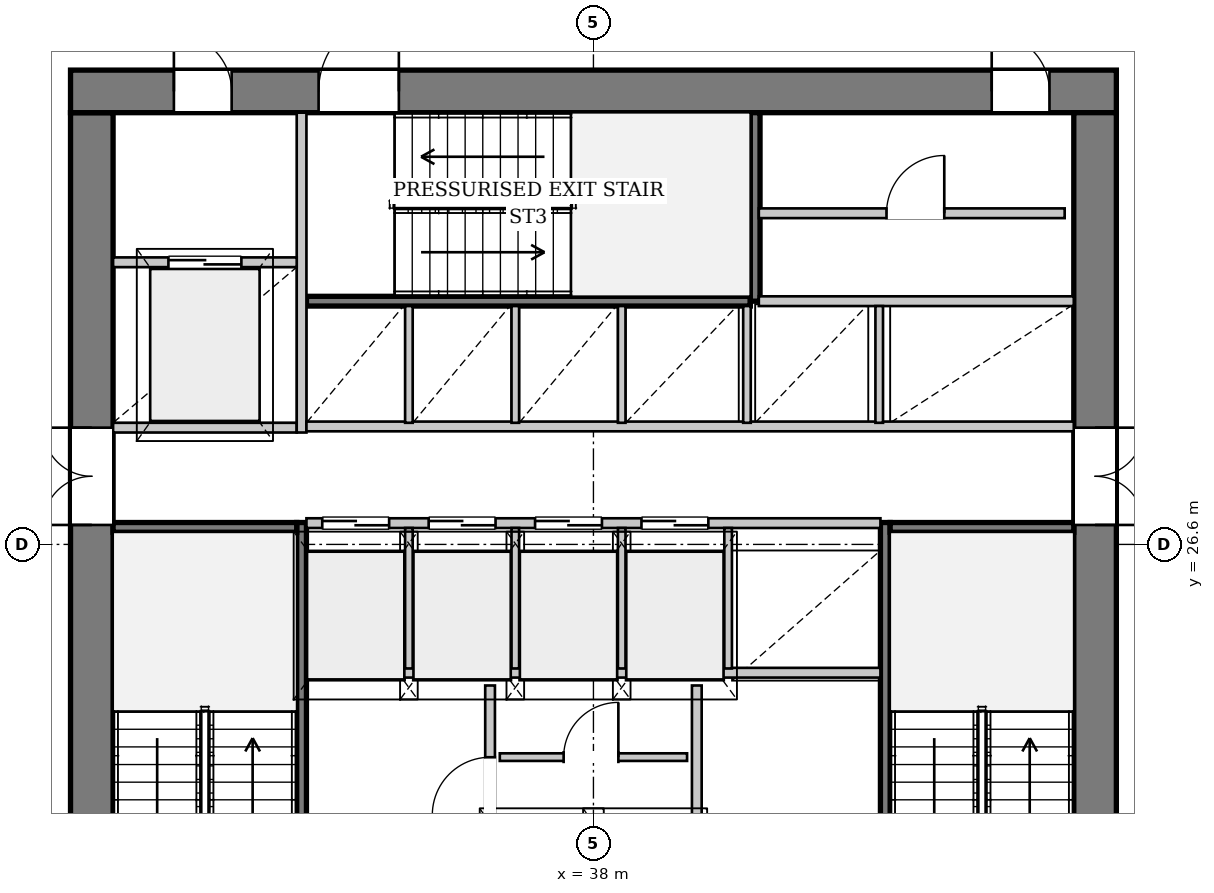
"""IFC4 building model, lengths in metres.
Left out: names, types, materials, properties, quantities, classifications, styles, units other than length and angle.
Written with IfcOpenShell. Run it as: python <this file> out.ifc"""

import sys

from ifc_helpers import new_model, si_unit, direction, frame, frame_2d, origin, place, context, subcontext, project, spatial, rectangle, extrude, source, transform, mapped, element, fill, save


model = new_model("IFC4")
c1 = context("Model", 3, precision=1e-05, world=origin(), true_north=direction((0.0, 1.0)))
c2 = subcontext(c1, "Body", "Model", "MODEL_VIEW")
j1 = project(units=[si_unit("LENGTHUNIT", "METRE"), si_unit("PLANEANGLEUNIT", "RADIAN")], contexts=[c1])
p1 = place(None, origin())
s1 = spatial("IfcSite", under=j1, at=p1, CompositionType="ELEMENT")
p2 = place(p1, origin())
s2 = spatial("IfcBuilding", under=s1, at=p2, CompositionType="ELEMENT")
p3 = place(p2, frame((0.0, 0.0, 102.15)))
s3 = spatial("IfcBuildingStorey", under=s2, at=p3, CompositionType="ELEMENT", Elevation=102.15)
p4 = place(p3, frame((29.75, 19.5, 0.0), z_axis=(0.0, 0.0, 1.0), x_axis=(0.0, 1.0, 0.0)))
e1 = element("IfcWall", 1, at=p4, inside=s3, PredefinedType="SHEAR", context=c2, shape_type="SweptSolid", body=[
    extrude(rectangle(XDim=14.2, YDim=0.7, at=frame_2d((7.1, 0.0))), origin(), (0.0, 0.0, 1.0), 3.3),
])
p5 = place(p4, frame((7.42, 0.0, 0.0)))
e2 = element("IfcOpeningElement", 2, at=p5, cuts=e1, PredefinedType="OPENING", context=c2, shape_type="SweptSolid", body=[
    extrude(rectangle(XDim=1.6, YDim=2.2, at=frame_2d((0.8, 1.1))), frame((0.0, 0.36, 0.0), z_axis=(0.0, -1.0, 0.0), x_axis=(1.0, 0.0, 0.0)), (0.0, 0.0, 1.0), 0.72),
])
p6 = place(p3, frame((29.4, 34.05, 0.0), z_axis=(0.0, 0.0, 1.0), x_axis=(1.0, 0.0, 0.0)))
e3 = element("IfcWall", 3, at=p6, inside=s3, PredefinedType="SHEAR", context=c2, shape_type="SweptSolid", body=[
    extrude(rectangle(XDim=17.2, YDim=0.7, at=frame_2d((8.6, 0.0))), origin(), (0.0, 0.0, 1.0), 3.3),
])
p7 = place(p6, frame((1.7, 0.0, 0.0)))
e4 = element("IfcOpeningElement", 4, at=p7, cuts=e3, PredefinedType="OPENING", context=c2, shape_type="SweptSolid", body=[
    extrude(rectangle(XDim=0.95, YDim=2.1, at=frame_2d((0.475, 1.05))), frame((0.0, 0.36, 0.0), z_axis=(0.0, -1.0, 0.0), x_axis=(1.0, 0.0, 0.0)), (0.0, 0.0, 1.0), 0.72),
])
p8 = place(p6, frame((4.08, 0.0, 0.0)))
e5 = element("IfcOpeningElement", 5, at=p8, cuts=e3, PredefinedType="OPENING", context=c2, shape_type="SweptSolid", body=[
    extrude(rectangle(XDim=1.32, YDim=2.2, at=frame_2d((0.66, 1.1))), frame((0.0, 0.36, 0.0), z_axis=(0.0, -1.0, 0.0), x_axis=(1.0, 0.0, 0.0)), (0.0, 0.0, 1.0), 0.72),
])
p9 = place(p6, frame((15.15, 0.0, 0.0)))
e6 = element("IfcOpeningElement", 6, at=p9, cuts=e3, PredefinedType="OPENING", context=c2, shape_type="SweptSolid", body=[
    extrude(rectangle(XDim=0.95, YDim=2.1, at=frame_2d((0.475, 1.05))), frame((0.0, 0.36, 0.0), z_axis=(0.0, -1.0, 0.0), x_axis=(1.0, 0.0, 0.0)), (0.0, 0.0, 1.0), 0.72),
])
p10 = place(p3, frame((46.25, 33.7, 0.0), z_axis=(0.0, 0.0, 1.0), x_axis=(0.0, -1.0, 0.0)))
e7 = element("IfcWall", 7, at=p10, inside=s3, PredefinedType="SHEAR", context=c2, shape_type="SweptSolid", body=[
    extrude(rectangle(XDim=14.2, YDim=0.7, at=frame_2d((7.1, 0.0))), origin(), (0.0, 0.0, 1.0), 3.3),
])
p11 = place(p10, frame((5.18, 0.0, 0.0)))
e8 = element("IfcOpeningElement", 8, at=p11, cuts=e7, PredefinedType="OPENING", context=c2, shape_type="SweptSolid", body=[
    extrude(rectangle(XDim=1.6, YDim=2.2, at=frame_2d((0.8, 1.1))), frame((0.0, 0.36, 0.0), z_axis=(0.0, -1.0, 0.0), x_axis=(1.0, 0.0, 0.0)), (0.0, 0.0, 1.0), 0.72),
])
p12 = place(p3, frame((33.2, 19.5, 0.0), z_axis=(0.0, 0.0, 1.0), x_axis=(0.0, 1.0, 0.0)))
e9 = element("IfcWall", 9, at=p12, inside=s3, PredefinedType="PARTITIONING", context=c2, shape_type="SweptSolid", body=[
    extrude(rectangle(XDim=7.46, YDim=0.16, at=frame_2d((3.73, 0.0))), origin(), (0.0, 0.0, 1.0), 3.3),
])
p13 = place(p12, frame((0.08, 0.0, 0.0)))
e10 = element("IfcOpeningElement", 10, at=p13, cuts=e9, PredefinedType="OPENING", context=c2, shape_type="SweptSolid", body=[
    extrude(rectangle(XDim=1.32, YDim=2.2, at=frame_2d((0.66, 1.1))), frame((0.0, 0.09, 0.0), z_axis=(0.0, -1.0, 0.0), x_axis=(1.0, 0.0, 0.0)), (0.0, 0.0, 1.0), 0.18),
])
p14 = place(p3, frame((30.1, 26.88, 0.0), z_axis=(0.0, 0.0, 1.0), x_axis=(1.0, 0.0, 0.0)))
e11 = element("IfcWall", 11, at=p14, inside=s3, PredefinedType="PARTITIONING", context=c2, shape_type="SweptSolid", body=[
    extrude(rectangle(XDim=3.02, YDim=0.16, at=frame_2d((1.51, 0.0))), origin(), (0.0, 0.0, 1.0), 3.3),
])
p15 = place(p3, frame((42.8, 26.96, 0.0), z_axis=(0.0, 0.0, 1.0), x_axis=(0.0, -1.0, 0.0)))
e12 = element("IfcWall", 12, at=p15, inside=s3, PredefinedType="PARTITIONING", context=c2, shape_type="SweptSolid", body=[
    extrude(rectangle(XDim=7.46, YDim=0.16, at=frame_2d((3.73, 0.0))), origin(), (0.0, 0.0, 1.0), 3.3),
])
p16 = place(p15, frame((6.06, 0.0, 0.0)))
e13 = element("IfcOpeningElement", 13, at=p16, cuts=e12, PredefinedType="OPENING", context=c2, shape_type="SweptSolid", body=[
    extrude(rectangle(XDim=1.32, YDim=2.2, at=frame_2d((0.66, 1.1))), frame((0.0, 0.09, 0.0), z_axis=(0.0, -1.0, 0.0), x_axis=(1.0, 0.0, 0.0)), (0.0, 0.0, 1.0), 0.18),
])
p17 = place(p3, frame((42.88, 26.88, 0.0), z_axis=(0.0, 0.0, 1.0), x_axis=(1.0, 0.0, 0.0)))
e14 = element("IfcWall", 14, at=p17, inside=s3, PredefinedType="PARTITIONING", context=c2, shape_type="SweptSolid", body=[
    extrude(rectangle(XDim=3.02, YDim=0.16, at=frame_2d((1.51, 0.0))), origin(), (0.0, 0.0, 1.0), 3.3),
])
p18 = place(p3, frame((33.28, 30.6, 0.0), z_axis=(0.0, 0.0, 1.0), x_axis=(1.0, 0.0, 0.0)))
e15 = element("IfcWall", 15, at=p18, inside=s3, PredefinedType="PARTITIONING", context=c2, shape_type="SweptSolid", body=[
    extrude(rectangle(XDim=7.3, YDim=0.16, at=frame_2d((3.65, 0.0))), origin(), (0.0, 0.0, 1.0), 3.3),
])
p19 = place(p3, frame((40.66, 30.6, 0.0), z_axis=(0.0, 0.0, 1.0), x_axis=(0.0, 1.0, 0.0)))
e16 = element("IfcWall", 16, at=p19, inside=s3, PredefinedType="PARTITIONING", context=c2, shape_type="SweptSolid", body=[
    extrude(rectangle(XDim=3.1, YDim=0.16, at=frame_2d((1.55, 0.0))), origin(), (0.0, 0.0, 1.0), 3.3),
])
p20 = place(p3, frame((36.3, 19.5, 0.0), z_axis=(0.0, 0.0, 1.0), x_axis=(0.0, 1.0, 0.0)))
e17 = element("IfcWall", 17, at=p20, inside=s3, PredefinedType="PARTITIONING", context=c2, shape_type="SweptSolid", body=[
    extrude(rectangle(XDim=4.78, YDim=0.16, at=frame_2d((2.39, 0.0))), origin(), (0.0, 0.0, 1.0), 3.3),
])
p21 = place(p20, frame((0.6, 0.0, 0.0)))
e18 = element("IfcOpeningElement", 18, at=p21, cuts=e17, PredefinedType="OPENING", context=c2, shape_type="SweptSolid", body=[
    extrude(rectangle(XDim=1.2, YDim=2.2, at=frame_2d((0.6, 1.1))), frame((0.0, 0.09, 0.0), z_axis=(0.0, -1.0, 0.0), x_axis=(1.0, 0.0, 0.0)), (0.0, 0.0, 1.0), 0.18),
])
p22 = place(p20, frame((2.65, 0.0, 0.0)))
e19 = element("IfcOpeningElement", 19, at=p22, cuts=e17, PredefinedType="OPENING", context=c2, shape_type="SweptSolid", body=[
    extrude(rectangle(XDim=0.95, YDim=2.1, at=frame_2d((0.475, 1.05))), frame((0.0, 0.09, 0.0), z_axis=(0.0, -1.0, 0.0), x_axis=(1.0, 0.0, 0.0)), (0.0, 0.0, 1.0), 0.18),
])
p23 = place(p3, frame((39.7, 24.28, 0.0), z_axis=(0.0, 0.0, 1.0), x_axis=(0.0, -1.0, 0.0)))
e20 = element("IfcWall", 20, at=p23, inside=s3, PredefinedType="PARTITIONING", context=c2, shape_type="SweptSolid", body=[
    extrude(rectangle(XDim=4.78, YDim=0.16, at=frame_2d((2.39, 0.0))), origin(), (0.0, 0.0, 1.0), 3.3),
])
p24 = place(p23, frame((3.12, 0.0, 0.0)))
e21 = element("IfcOpeningElement", 21, at=p24, cuts=e20, PredefinedType="OPENING", context=c2, shape_type="SweptSolid", body=[
    extrude(rectangle(XDim=1.2, YDim=2.2, at=frame_2d((0.6, 1.1))), frame((0.0, 0.09, 0.0), z_axis=(0.0, -1.0, 0.0), x_axis=(1.0, 0.0, 0.0)), (0.0, 0.0, 1.0), 0.18),
])
p25 = place(p3, frame((33.28, 24.49, 0.0), z_axis=(0.0, 0.0, 1.0), x_axis=(1.0, 0.0, 0.0)))
e22 = element("IfcWall", 22, at=p25, inside=s3, PredefinedType="PARTITIONING", context=c2, shape_type="SweptSolid", body=[
    extrude(rectangle(XDim=9.44, YDim=0.16, at=frame_2d((4.72, 0.0))), origin(), (0.0, 0.0, 1.0), 3.3),
])
p26 = place(p3, frame((36.46, 23.102, 0.0), z_axis=(0.0, 0.0, 1.0), x_axis=(1.0, 0.0, 0.0)))
e23 = element("IfcWall", 23, at=p26, inside=s3, PredefinedType="PARTITIONING", context=c2, shape_type="SweptSolid", body=[
    extrude(rectangle(XDim=3.08, YDim=0.125, at=frame_2d((1.54, 0.0))), origin(), (0.0, 0.0, 1.0), 3.3),
])
p27 = place(p26, frame((1.05, 0.0, 0.0)))
e24 = element("IfcOpeningElement", 24, at=p27, cuts=e23, PredefinedType="OPENING", context=c2, shape_type="SweptSolid", body=[
    extrude(rectangle(XDim=0.9, YDim=2.1, at=frame_2d((0.45, 1.05))), frame((0.0, 0.073, 0.0), z_axis=(0.0, -1.0, 0.0), x_axis=(1.0, 0.0, 0.0)), (0.0, 0.0, 1.0), 0.145),
])
p28 = place(p3, frame((30.1, 28.52, 0.0), z_axis=(0.0, 0.0, 1.0), x_axis=(1.0, 0.0, 0.0)))
e25 = element("IfcWall", 25, at=p28, inside=s3, PredefinedType="PARTITIONING", context=c2, shape_type="SweptSolid", body=[
    extrude(rectangle(XDim=3.02, YDim=0.16, at=frame_2d((1.51, 0.0))), origin(), (0.0, 0.0, 1.0), 3.3),
])
p29 = place(p3, frame((33.2, 28.44, 0.0), z_axis=(0.0, 0.0, 1.0), x_axis=(0.0, 1.0, 0.0)))
e26 = element("IfcWall", 26, at=p29, inside=s3, PredefinedType="PARTITIONING", context=c2, shape_type="SweptSolid", body=[
    extrude(rectangle(XDim=5.26, YDim=0.16, at=frame_2d((2.63, 0.0))), origin(), (0.0, 0.0, 1.0), 3.3),
])
p30 = place(p3, frame((30.1, 31.24, 0.0), z_axis=(0.0, 0.0, 1.0), x_axis=(1.0, 0.0, 0.0)))
e27 = element("IfcWall", 27, at=p30, inside=s3, PredefinedType="PARTITIONING", context=c2, shape_type="SweptSolid", body=[
    extrude(rectangle(XDim=3.02, YDim=0.16, at=frame_2d((1.51, 0.0))), origin(), (0.0, 0.0, 1.0), 3.3),
])
p31 = place(p30, frame((0.91, 0.0, 0.0)))
e28 = element("IfcOpeningElement", 28, at=p31, cuts=e27, PredefinedType="OPENING", context=c2, shape_type="SweptSolid", body=[
    extrude(rectangle(XDim=1.2, YDim=2.2, at=frame_2d((0.6, 1.1))), frame((0.0, 0.09, 0.0), z_axis=(0.0, -1.0, 0.0), x_axis=(1.0, 0.0, 0.0)), (0.0, 0.0, 1.0), 0.18),
])
p32 = place(p3, frame((33.28, 26.95, 0.0), z_axis=(0.0, 0.0, 1.0), x_axis=(1.0, 0.0, 0.0)))
e29 = element("IfcWall", 29, at=p32, inside=s3, PredefinedType="PARTITIONING", context=c2, shape_type="SweptSolid", body=[
    extrude(rectangle(XDim=9.44, YDim=0.16, at=frame_2d((4.72, 0.0))), origin(), (0.0, 0.0, 1.0), 3.3),
])
p33 = place(p32, frame((0.26, 0.0, 0.0)))
e30 = element("IfcOpeningElement", 30, at=p33, cuts=e29, PredefinedType="OPENING", context=c2, shape_type="SweptSolid", body=[
    extrude(rectangle(XDim=1.1, YDim=2.2, at=frame_2d((0.55, 1.1))), frame((0.0, 0.09, 0.0), z_axis=(0.0, -1.0, 0.0), x_axis=(1.0, 0.0, 0.0)), (0.0, 0.0, 1.0), 0.18),
])
p34 = place(p32, frame((2.01, 0.0, 0.0)))
e31 = element("IfcOpeningElement", 31, at=p34, cuts=e29, PredefinedType="OPENING", context=c2, shape_type="SweptSolid", body=[
    extrude(rectangle(XDim=1.1, YDim=2.2, at=frame_2d((0.55, 1.1))), frame((0.0, 0.09, 0.0), z_axis=(0.0, -1.0, 0.0), x_axis=(1.0, 0.0, 0.0)), (0.0, 0.0, 1.0), 0.18),
])
p35 = place(p32, frame((3.76, 0.0, 0.0)))
e32 = element("IfcOpeningElement", 32, at=p35, cuts=e29, PredefinedType="OPENING", context=c2, shape_type="SweptSolid", body=[
    extrude(rectangle(XDim=1.1, YDim=2.2, at=frame_2d((0.55, 1.1))), frame((0.0, 0.09, 0.0), z_axis=(0.0, -1.0, 0.0), x_axis=(1.0, 0.0, 0.0)), (0.0, 0.0, 1.0), 0.18),
])
p36 = place(p32, frame((5.51, 0.0, 0.0)))
e33 = element("IfcOpeningElement", 33, at=p36, cuts=e29, PredefinedType="OPENING", context=c2, shape_type="SweptSolid", body=[
    extrude(rectangle(XDim=1.1, YDim=2.2, at=frame_2d((0.55, 1.1))), frame((0.0, 0.09, 0.0), z_axis=(0.0, -1.0, 0.0), x_axis=(1.0, 0.0, 0.0)), (0.0, 0.0, 1.0), 0.18),
])
for number, where, z_axis, x_axis in (
    (34, (34.965, 24.56, 0.0), (0.0, 0.0, 1.0), (0.0, 1.0, 0.0)),
    (35, (36.715, 24.56, 0.0), (0.0, 0.0, 1.0), (0.0, 1.0, 0.0)),
    (36, (38.465, 24.56, 0.0), (0.0, 0.0, 1.0), (0.0, 1.0, 0.0)),
    (37, (40.215, 24.56, 0.0), (0.0, 0.0, 1.0), (0.0, 1.0, 0.0)),
):
    element("IfcWall", number, at=place(p3, frame(where, z_axis=z_axis, x_axis=x_axis)), inside=s3, PredefinedType="PARTITIONING", context=c2, shape_type="SweptSolid", body=[
        extrude(rectangle(XDim=2.31, YDim=0.125, at=frame_2d((1.155, 0.0))), origin(), (0.0, 0.0, 1.0), 3.3),
    ])
p37 = place(p3, frame((33.28, 28.54, 0.0), z_axis=(0.0, 0.0, 1.0), x_axis=(1.0, 0.0, 0.0)))
e38 = element("IfcWall", 38, at=p37, inside=s3, PredefinedType="PARTITIONING", context=c2, shape_type="SweptSolid", body=[
    extrude(rectangle(XDim=12.62, YDim=0.16, at=frame_2d((6.31, 0.0))), origin(), (0.0, 0.0, 1.0), 3.3),
])
p38 = place(p3, frame((40.72, 30.6, 0.0), z_axis=(0.0, 0.0, 1.0), x_axis=(1.0, 0.0, 0.0)))
e39 = element("IfcWall", 39, at=p38, inside=s3, PredefinedType="PARTITIONING", context=c2, shape_type="SweptSolid", body=[
    extrude(rectangle(XDim=5.18, YDim=0.16, at=frame_2d((2.59, 0.0))), origin(), (0.0, 0.0, 1.0), 3.3),
])
for number, where, z_axis, x_axis in (
    (40, (34.965, 28.6, 0.0), (0.0, 0.0, 1.0), (0.0, 1.0, 0.0)),
    (41, (36.715, 28.6, 0.0), (0.0, 0.0, 1.0), (0.0, 1.0, 0.0)),
    (42, (38.465, 28.6, 0.0), (0.0, 0.0, 1.0), (0.0, 1.0, 0.0)),
    (43, (40.525, 28.6, 0.0), (0.0, 0.0, 1.0), (0.0, 1.0, 0.0)),
    (44, (42.7, 28.6, 0.0), (0.0, 0.0, 1.0), (0.0, 1.0, 0.0)),
):
    element("IfcWall", number, at=place(p3, frame(where, z_axis=z_axis, x_axis=x_axis)), inside=s3, PredefinedType="PARTITIONING", context=c2, shape_type="SweptSolid", body=[
        extrude(rectangle(XDim=1.92, YDim=0.125, at=frame_2d((0.96, 0.0))), origin(), (0.0, 0.0, 1.0), 3.3),
    ])
p39 = place(p3, frame((40.72, 32.046, 0.0), z_axis=(0.0, 0.0, 1.0), x_axis=(1.0, 0.0, 0.0)))
e45 = element("IfcWall", 45, at=p39, inside=s3, PredefinedType="PARTITIONING", context=c2, shape_type="SweptSolid", body=[
    extrude(rectangle(XDim=5.03, YDim=0.16, at=frame_2d((2.515, 0.0))), origin(), (0.0, 0.0, 1.0), 3.3),
])
p40 = place(p39, frame((2.1, 0.0, 0.0)))
e46 = element("IfcOpeningElement", 46, at=p40, cuts=e45, PredefinedType="OPENING", context=c2, shape_type="SweptSolid", body=[
    extrude(rectangle(XDim=0.95, YDim=2.1, at=frame_2d((0.475, 1.05))), frame((0.0, 0.09, 0.0), z_axis=(0.0, -1.0, 0.0), x_axis=(1.0, 0.0, 0.0)), (0.0, 0.0, 1.0), 0.18),
])
m1 = source(origin(), c2, "Body", "SweptSolid", [
    extrude(rectangle(XDim=1.6, YDim=2.2, at=frame_2d((0.8, 1.1))), frame((0.0, 0.025, 0.0), z_axis=(0.0, -1.0, 0.0), x_axis=(1.0, 0.0, 0.0)), (0.0, 0.0, 1.0), 0.05),
])
p41 = place(p5, origin())
e47 = element("IfcDoor", 47, at=p41, inside=s3, OperationType="DOUBLE_DOOR_SINGLE_SWING", PredefinedType="DOOR", context=c2, shape_type="MappedRepresentation", body=[
    mapped(m1, transform((0.0, 0.0, 0.0), x_axis=(1.0, 0.0, 0.0), y_axis=(0.0, 1.0, 0.0), z_axis=(0.0, 0.0, 1.0), scale=1.0)),
])
fill(e2, e47)
m2 = source(origin(), c2, "Body", "SweptSolid", [
    extrude(rectangle(XDim=0.95, YDim=2.1, at=frame_2d((0.475, 1.05))), frame((0.0, 0.025, 0.0), z_axis=(0.0, -1.0, 0.0), x_axis=(1.0, 0.0, 0.0)), (0.0, 0.0, 1.0), 0.05),
])
p42 = place(p7, origin())
e48 = element("IfcDoor", 48, at=p42, inside=s3, OperationType="SINGLE_SWING_LEFT", PredefinedType="DOOR", context=c2, shape_type="MappedRepresentation", body=[
    mapped(m2, transform((0.0, 0.0, 0.0), x_axis=(1.0, 0.0, 0.0), y_axis=(0.0, 1.0, 0.0), z_axis=(0.0, 0.0, 1.0), scale=1.0)),
])
fill(e4, e48)
m3 = source(origin(), c2, "Body", "SweptSolid", [
    extrude(rectangle(XDim=1.32, YDim=2.2, at=frame_2d((0.66, 1.1))), frame((0.0, 0.025, 0.0), z_axis=(0.0, -1.0, 0.0), x_axis=(1.0, 0.0, 0.0)), (0.0, 0.0, 1.0), 0.05),
])
p43 = place(p8, origin())
e49 = element("IfcDoor", 49, at=p43, inside=s3, OperationType="SINGLE_SWING_RIGHT", PredefinedType="DOOR", context=c2, shape_type="MappedRepresentation", body=[
    mapped(m3, transform((0.0, 0.0, 0.0), x_axis=(1.0, 0.0, 0.0), y_axis=(0.0, 1.0, 0.0), z_axis=(0.0, 0.0, 1.0), scale=1.0)),
])
fill(e5, e49)
p44 = place(p11, origin())
e50 = element("IfcDoor", 50, at=p44, inside=s3, OperationType="DOUBLE_DOOR_SINGLE_SWING", PredefinedType="DOOR", context=c2, shape_type="MappedRepresentation", body=[
    mapped(m1, transform((0.0, 0.0, 0.0), x_axis=(1.0, 0.0, 0.0), y_axis=(0.0, 1.0, 0.0), z_axis=(0.0, 0.0, 1.0), scale=1.0)),
])
fill(e8, e50)
p45 = place(p22, origin())
e51 = element("IfcDoor", 51, at=p45, inside=s3, OperationType="SINGLE_SWING_LEFT", PredefinedType="DOOR", context=c2, shape_type="MappedRepresentation", body=[
    mapped(m2, transform((0.0, 0.0, 0.0), x_axis=(1.0, 0.0, 0.0), y_axis=(0.0, 1.0, 0.0), z_axis=(0.0, 0.0, 1.0), scale=1.0)),
])
fill(e19, e51)
m4 = source(origin(), c2, "Body", "SweptSolid", [
    extrude(rectangle(XDim=0.9, YDim=2.1, at=frame_2d((0.45, 1.05))), frame((0.0, 0.025, 0.0), z_axis=(0.0, -1.0, 0.0), x_axis=(1.0, 0.0, 0.0)), (0.0, 0.0, 1.0), 0.05),
])
p46 = place(p27, origin())
e52 = element("IfcDoor", 52, at=p46, inside=s3, OperationType="SINGLE_SWING_RIGHT", PredefinedType="DOOR", context=c2, shape_type="MappedRepresentation", body=[
    mapped(m4, transform((0.0, 0.0, 0.0), x_axis=(1.0, 0.0, 0.0), y_axis=(0.0, 1.0, 0.0), z_axis=(0.0, 0.0, 1.0), scale=1.0)),
])
fill(e24, e52)
m5 = source(origin(), c2, "Body", "SweptSolid", [
    extrude(rectangle(XDim=1.2, YDim=2.2, at=frame_2d((0.6, 1.1))), frame((0.0, 0.025, 0.0), z_axis=(0.0, -1.0, 0.0), x_axis=(1.0, 0.0, 0.0)), (0.0, 0.0, 1.0), 0.05),
])
p47 = place(p31, origin())
e53 = element("IfcDoor", 53, at=p47, inside=s3, OperationType="DOUBLE_DOOR_SLIDING", PredefinedType="DOOR", context=c2, shape_type="MappedRepresentation", body=[
    mapped(m5, transform((0.0, 0.0, 0.0), x_axis=(1.0, 0.0, 0.0), y_axis=(0.0, 1.0, 0.0), z_axis=(0.0, 0.0, 1.0), scale=1.0)),
])
fill(e28, e53)
m6 = source(origin(), c2, "Body", "SweptSolid", [
    extrude(rectangle(XDim=1.1, YDim=2.2, at=frame_2d((0.55, 1.1))), frame((0.0, 0.025, 0.0), z_axis=(0.0, -1.0, 0.0), x_axis=(1.0, 0.0, 0.0)), (0.0, 0.0, 1.0), 0.05),
])
p48 = place(p33, origin())
e54 = element("IfcDoor", 54, at=p48, inside=s3, OperationType="DOUBLE_DOOR_SLIDING", PredefinedType="DOOR", context=c2, shape_type="MappedRepresentation", body=[
    mapped(m6, transform((0.0, 0.0, 0.0), x_axis=(1.0, 0.0, 0.0), y_axis=(0.0, 1.0, 0.0), z_axis=(0.0, 0.0, 1.0), scale=1.0)),
])
fill(e30, e54)
p49 = place(p34, origin())
e55 = element("IfcDoor", 55, at=p49, inside=s3, OperationType="DOUBLE_DOOR_SLIDING", PredefinedType="DOOR", context=c2, shape_type="MappedRepresentation", body=[
    mapped(m6, transform((0.0, 0.0, 0.0), x_axis=(1.0, 0.0, 0.0), y_axis=(0.0, 1.0, 0.0), z_axis=(0.0, 0.0, 1.0), scale=1.0)),
])
fill(e31, e55)
p50 = place(p35, origin())
e56 = element("IfcDoor", 56, at=p50, inside=s3, OperationType="DOUBLE_DOOR_SLIDING", PredefinedType="DOOR", context=c2, shape_type="MappedRepresentation", body=[
    mapped(m6, transform((0.0, 0.0, 0.0), x_axis=(1.0, 0.0, 0.0), y_axis=(0.0, 1.0, 0.0), z_axis=(0.0, 0.0, 1.0), scale=1.0)),
])
fill(e32, e56)
p51 = place(p36, origin())
e57 = element("IfcDoor", 57, at=p51, inside=s3, OperationType="DOUBLE_DOOR_SLIDING", PredefinedType="DOOR", context=c2, shape_type="MappedRepresentation", body=[
    mapped(m6, transform((0.0, 0.0, 0.0), x_axis=(1.0, 0.0, 0.0), y_axis=(0.0, 1.0, 0.0), z_axis=(0.0, 0.0, 1.0), scale=1.0)),
])
fill(e33, e57)
p52 = place(p40, origin())
e58 = element("IfcDoor", 58, at=p52, inside=s3, OperationType="SINGLE_SWING_RIGHT", PredefinedType="DOOR", context=c2, shape_type="MappedRepresentation", body=[
    mapped(m2, transform((0.0, 0.0, 0.0), x_axis=(1.0, 0.0, 0.0), y_axis=(0.0, 1.0, 0.0), z_axis=(0.0, 0.0, 1.0), scale=1.0)),
])
fill(e46, e58)
p53 = place(p9, origin())
e59 = element("IfcDoor", 59, at=p53, inside=s3, OperationType="SINGLE_SWING_LEFT", PredefinedType="DOOR", context=c2, shape_type="MappedRepresentation", body=[
    mapped(m2, transform((0.0, 0.0, 0.0), x_axis=(1.0, 0.0, 0.0), y_axis=(0.0, 1.0, 0.0), z_axis=(0.0, 0.0, 1.0), scale=1.0)),
])
fill(e6, e59)
save(model, sys.argv[1])
